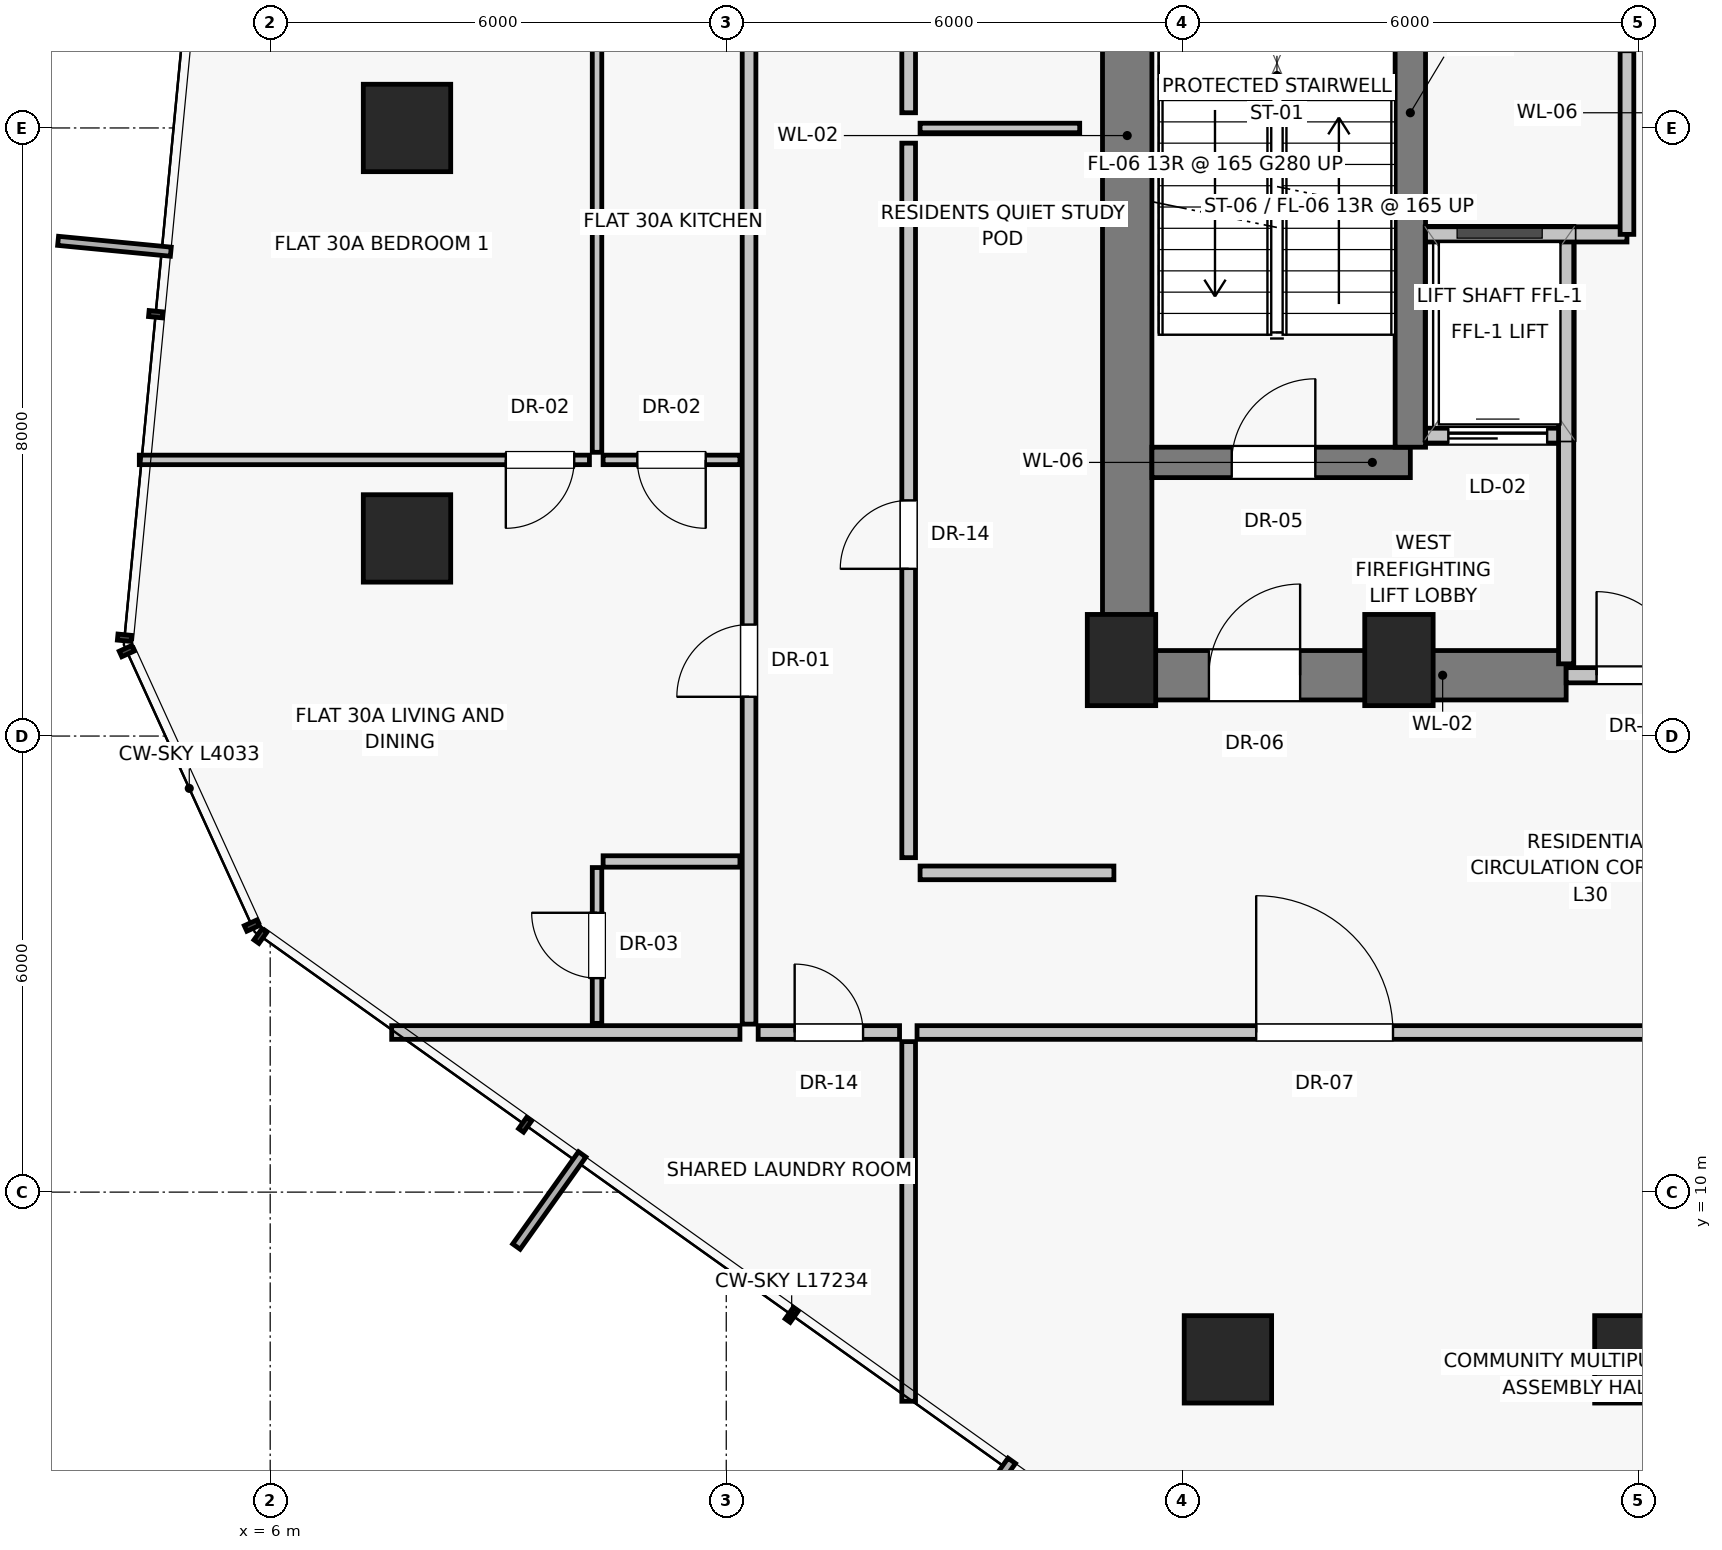
"""IFC4 building model, lengths in metres.
Left out: names, types, materials, properties, quantities, classifications, styles, units other than length and angle.
Written with IfcOpenShell. Run it as: python <this file> out.ifc"""

import sys

from ifc_helpers import new_model, si_unit, direction, frame, frame_2d, origin, origin_2d, place, context, subcontext, project, spatial, rectangle, extrude, source, transform, mapped, element, fill, save


model = new_model("IFC4")
c1 = context("Model", 3, precision=1e-05, world=origin(), true_north=direction((0.0, 1.0)))
c2 = subcontext(c1, "Body", "Model", "MODEL_VIEW")
j1 = project(units=[si_unit("LENGTHUNIT", "METRE"), si_unit("PLANEANGLEUNIT", "RADIAN")], contexts=[c1])
p1 = place(None, origin())
s1 = spatial("IfcSite", under=j1, at=p1, CompositionType="ELEMENT")
p2 = place(p1, origin())
s2 = spatial("IfcBuilding", under=s1, at=p2, CompositionType="ELEMENT")
p3 = place(p2, frame((0.0, 0.0, 108.95)))
s3 = spatial("IfcBuildingStorey", under=s2, at=p3, CompositionType="ELEMENT", Elevation=108.95)
for number, where, z_axis, x_axis in (
    (1, (17.2, 17.0, 0.0), (0.0, 0.0, 1.0), (1.0, 0.0, 0.0)),
    (2, (20.85, 17.0, 0.0), (0.0, 0.0, 1.0), (1.0, 0.0, 0.0)),
):
    element("IfcColumn", number, at=place(p3, frame(where, z_axis=z_axis, x_axis=x_axis)), inside=s3, PredefinedType="PILASTER", context=c2, shape_type="SweptSolid", body=[
        extrude(rectangle(XDim=0.9, YDim=1.2, at=origin_2d()), origin(), (0.0, 0.0, 1.0), 4.3),
    ])
for number, where, z_axis, x_axis in (
    (3, (7.8, 24.0, 0.0), (0.0, 0.0, 1.0), (1.0, 0.0, 0.0)),
    (4, (7.8, 18.6, 0.0), (0.0, 0.0, 1.0), (1.0, 0.0, 0.0)),
    (5, (18.6, 7.8, 0.0), (0.0, 0.0, 1.0), (1.0, 0.0, 0.0)),
    (6, (24.0, 7.8, 0.0), (0.0, 0.0, 1.0), (1.0, 0.0, 0.0)),
):
    element("IfcColumn", number, at=place(p3, frame(where, z_axis=z_axis, x_axis=x_axis)), inside=s3, PredefinedType="COLUMN", context=c2, shape_type="SweptSolid", body=[
        extrude(rectangle(XDim=1.15, YDim=1.15, at=origin_2d()), origin(), (0.0, 0.0, 1.0), 4.3),
    ])
p4 = place(p3, frame((17.275, 16.8, 0.0), z_axis=(0.0, 0.0, 1.0), x_axis=(0.0, 1.0, 0.0)))
e7 = element("IfcWall", 7, at=p4, inside=s3, PredefinedType="SHEAR", context=c2, shape_type="SweptSolid", body=[
    extrude(rectangle(XDim=14.2, YDim=0.65, at=frame_2d((7.1, 0.0))), origin(), (0.0, 0.0, 1.0), 4.05),
])
p5 = place(p3, frame((17.2, 16.8, 0.0), z_axis=(0.0, 0.0, 1.0), x_axis=(1.0, 0.0, 0.0)))
e8 = element("IfcWall", 8, at=p5, inside=s3, PredefinedType="SHEAR", context=c2, shape_type="SweptSolid", body=[
    extrude(rectangle(XDim=5.85, YDim=0.65, at=frame_2d((2.925, 0.0))), origin(), (0.0, 0.0, 1.0), 4.05),
])
p6 = place(p5, frame((1.15, 0.0, 0.0)))
e9 = element("IfcOpeningElement", 9, at=p6, cuts=e8, PredefinedType="OPENING", context=c2, shape_type="SweptSolid", body=[
    extrude(rectangle(XDim=1.2, YDim=2.03, at=frame_2d((0.6, 1.015))), frame((0.0, 0.335, 0.0), z_axis=(0.0, -1.0, 0.0), x_axis=(1.0, 0.0, 0.0)), (0.0, 0.0, 1.0), 0.67),
])
p7 = place(p3, frame((23.05, 16.8, 0.0), z_axis=(0.0, 0.0, 1.0), x_axis=(1.0, 0.0, 0.0)))
e10 = element("IfcWall", 10, at=p7, inside=s3, PredefinedType="SOLIDWALL", context=c2, shape_type="SweptSolid", body=[
    extrude(rectangle(XDim=1.9, YDim=0.2, at=frame_2d((0.95, 0.0))), origin(), (0.0, 0.0, 1.0), 3.2),
])
p8 = place(p7, frame((0.4, 0.0, 0.0)))
e11 = element("IfcOpeningElement", 11, at=p8, cuts=e10, PredefinedType="OPENING", context=c2, shape_type="SweptSolid", body=[
    extrude(rectangle(XDim=1.1, YDim=2.03, at=frame_2d((0.55, 1.015))), frame((0.0, 0.11, 0.0), z_axis=(0.0, -1.0, 0.0), x_axis=(1.0, 0.0, 0.0)), (0.0, 0.0, 1.0), 0.22),
])
p9 = place(p3, frame((17.6, 19.6, 0.0), z_axis=(0.0, 0.0, 1.0), x_axis=(1.0, 0.0, 0.0)))
e12 = element("IfcWall", 12, at=p9, inside=s3, PredefinedType="SHEAR", context=c2, shape_type="SweptSolid", body=[
    extrude(rectangle(XDim=3.4, YDim=0.4, at=frame_2d((1.7, 0.0))), origin(), (0.0, 0.0, 1.0), 4.05),
])
p10 = place(p9, frame((1.05, 0.0, 0.0)))
e13 = element("IfcOpeningElement", 13, at=p10, cuts=e12, PredefinedType="OPENING", context=c2, shape_type="SweptSolid", body=[
    extrude(rectangle(XDim=1.1, YDim=2.03, at=frame_2d((0.55, 1.015))), frame((0.0, 0.21, 0.0), z_axis=(0.0, -1.0, 0.0), x_axis=(1.0, 0.0, 0.0)), (0.0, 0.0, 1.0), 0.42),
])
p11 = place(p3, frame((21.2, 19.95, 0.0), z_axis=(0.0, 0.0, 1.0), x_axis=(1.0, 0.0, 0.0)))
e14 = element("IfcWall", 14, at=p11, inside=s3, PredefinedType="SOLIDWALL", context=c2, shape_type="SweptSolid", body=[
    extrude(rectangle(XDim=1.85, YDim=0.2, at=frame_2d((0.925, 0.0))), origin(), (0.0, 0.0, 1.0), 4.05),
])
p12 = place(p11, frame((0.3, 0.0, 0.0)))
e15 = element("IfcOpeningElement", 15, at=p12, cuts=e14, PredefinedType="OPENING", context=c2, shape_type="SweptSolid", body=[
    extrude(rectangle(XDim=1.3, YDim=2.25, at=frame_2d((0.65, 1.125))), frame((0.0, 0.11, 0.0), z_axis=(0.0, -1.0, 0.0), x_axis=(1.0, 0.0, 0.0)), (0.0, 0.0, 1.0), 0.22),
])
p13 = place(p3, frame((21.0, 19.8, 0.0), z_axis=(0.0, 0.0, 1.0), x_axis=(0.0, 1.0, 0.0)))
e16 = element("IfcWall", 16, at=p13, inside=s3, PredefinedType="SHEAR", context=c2, shape_type="SweptSolid", body=[
    extrude(rectangle(XDim=8.8, YDim=0.4, at=frame_2d((4.4, 0.0))), origin(), (0.0, 0.0, 1.0), 4.05),
])
p14 = place(p3, frame((23.05, 16.95, 0.0), z_axis=(0.0, 0.0, 1.0), x_axis=(0.0, 1.0, 0.0)))
e17 = element("IfcWall", 17, at=p14, inside=s3, PredefinedType="SOLIDWALL", context=c2, shape_type="SweptSolid", body=[
    extrude(rectangle(XDim=5.6, YDim=0.2, at=frame_2d((2.8, 0.0))), origin(), (0.0, 0.0, 1.0), 4.05),
])
p15 = place(p3, frame((21.2, 22.6, 0.0), z_axis=(0.0, 0.0, 1.0), x_axis=(1.0, 0.0, 0.0)))
e18 = element("IfcWall", 18, at=p15, inside=s3, PredefinedType="SOLIDWALL", context=c2, shape_type="SweptSolid", body=[
    extrude(rectangle(XDim=2.65, YDim=0.2, at=frame_2d((1.325, 0.0))), origin(), (0.0, 0.0, 1.0), 4.05),
])
p16 = place(p3, frame((23.85, 22.6, 0.0), z_axis=(0.0, 0.0, 1.0), x_axis=(0.0, 1.0, 0.0)))
e19 = element("IfcWall", 19, at=p16, inside=s3, PredefinedType="PARTITIONING", context=c2, shape_type="SweptSolid", body=[
    extrude(rectangle(XDim=6.1, YDim=0.18, at=frame_2d((3.05, 0.0))), origin(), (0.0, 0.0, 1.0), 4.05),
])
p17 = place(p16, frame((2.4, 0.0, 0.0)))
e20 = element("IfcOpeningElement", 20, at=p17, cuts=e19, PredefinedType="OPENING", context=c2, shape_type="SweptSolid", body=[
    extrude(rectangle(XDim=0.9, YDim=2.01, at=frame_2d((0.45, 1.005))), frame((0.0, 0.1, 0.0), z_axis=(0.0, -1.0, 0.0), x_axis=(1.0, 0.0, 0.0)), (0.0, 0.0, 1.0), 0.2),
])
p18 = place(p3, frame((14.4, 14.4, 0.0), z_axis=(0.0, 0.0, 1.0), x_axis=(0.0, 1.0, 0.0)))
e21 = element("IfcWall", 21, at=p18, inside=s3, PredefinedType="PARTITIONING", context=c2, shape_type="SweptSolid", body=[
    extrude(rectangle(XDim=9.4, YDim=0.18, at=frame_2d((4.7, 0.0))), origin(), (0.0, 0.0, 1.0), 4.05),
])
p19 = place(p18, frame((3.8, 0.0, 0.0)))
e22 = element("IfcOpeningElement", 22, at=p19, cuts=e21, PredefinedType="OPENING", context=c2, shape_type="SweptSolid", body=[
    extrude(rectangle(XDim=0.9, YDim=2.01, at=frame_2d((0.45, 1.005))), frame((0.0, 0.1, 0.0), z_axis=(0.0, -1.0, 0.0), x_axis=(1.0, 0.0, 0.0)), (0.0, 0.0, 1.0), 0.2),
])
p20 = place(p3, frame((14.4, 24.2, 0.0), z_axis=(0.0, 0.0, 1.0), x_axis=(0.0, 1.0, 0.0)))
e23 = element("IfcWall", 23, at=p20, inside=s3, PredefinedType="PARTITIONING", context=c2, shape_type="SweptSolid", body=[
    extrude(rectangle(XDim=9.2, YDim=0.18, at=frame_2d((4.6, 0.0))), origin(), (0.0, 0.0, 1.0), 4.05),
])
p21 = place(p20, frame((3.8, 0.0, 0.0)))
e24 = element("IfcOpeningElement", 24, at=p21, cuts=e23, PredefinedType="OPENING", context=c2, shape_type="SweptSolid", body=[
    extrude(rectangle(XDim=0.9, YDim=2.01, at=frame_2d((0.45, 1.005))), frame((0.0, 0.1, 0.0), z_axis=(0.0, -1.0, 0.0), x_axis=(1.0, 0.0, 0.0)), (0.0, 0.0, 1.0), 0.2),
])
p22 = place(p3, frame((14.55, 24.0, 0.0), z_axis=(0.0, 0.0, 1.0), x_axis=(1.0, 0.0, 0.0)))
e25 = element("IfcWall", 25, at=p22, inside=s3, PredefinedType="PARTITIONING", context=c2, shape_type="SweptSolid", body=[
    extrude(rectangle(XDim=2.1, YDim=0.125, at=frame_2d((1.05, 0.0))), origin(), (0.0, 0.0, 1.0), 4.05),
])
p23 = place(p3, frame((14.55, 14.2, 0.0), z_axis=(0.0, 0.0, 1.0), x_axis=(1.0, 0.0, 0.0)))
e26 = element("IfcWall", 26, at=p23, inside=s3, PredefinedType="PARTITIONING", context=c2, shape_type="SweptSolid", body=[
    extrude(rectangle(XDim=2.55, YDim=0.18, at=frame_2d((1.275, 0.0))), origin(), (0.0, 0.0, 1.0), 4.05),
])
p24 = place(p3, frame((14.4, 11.98, 0.0), z_axis=(0.0, 0.0, 1.0), x_axis=(0.0, -1.0, 0.0)))
e27 = element("IfcWall", 27, at=p24, inside=s3, PredefinedType="PARTITIONING", context=c2, shape_type="SweptSolid", body=[
    extrude(rectangle(XDim=4.732, YDim=0.18, at=frame_2d((2.366, 0.0))), origin(), (0.0, 0.0, 1.0), 4.05),
])
p25 = place(p3, frame((14.51, 12.1, 0.0), z_axis=(0.0, 0.0, 1.0), x_axis=(1.0, 0.0, 0.0)))
e28 = element("IfcWall", 28, at=p25, inside=s3, PredefinedType="PARTITIONING", context=c2, shape_type="SweptSolid", body=[
    extrude(rectangle(XDim=10.724, YDim=0.18, at=frame_2d((5.362, 0.0))), origin(), (0.0, 0.0, 1.0), 3.63),
])
p26 = place(p25, frame((4.462, 0.0, 0.0)))
e29 = element("IfcOpeningElement", 29, at=p26, cuts=e28, PredefinedType="OPENING", context=c2, shape_type="SweptSolid", body=[
    extrude(rectangle(XDim=1.8, YDim=2.25, at=frame_2d((0.9, 1.125))), frame((0.0, 0.1, 0.0), z_axis=(0.0, -1.0, 0.0), x_axis=(1.0, 0.0, 0.0)), (0.0, 0.0, 1.0), 0.2),
])
p27 = place(p3, frame((12.18, 12.1, 0.0), z_axis=(0.0, 0.0, 1.0), x_axis=(-1.0, 0.0, 0.0)))
e30 = element("IfcWall", 30, at=p27, inside=s3, PredefinedType="PARTITIONING", context=c2, shape_type="SweptSolid", body=[
    extrude(rectangle(XDim=4.582, YDim=0.18, at=frame_2d((2.291, 0.0))), origin(), (0.0, 0.0, 1.0), 4.05),
])
p28 = place(p3, frame((12.3, 12.21, 0.0), z_axis=(0.0, 0.0, 1.0), x_axis=(0.0, 1.0, 0.0)))
e31 = element("IfcWall", 31, at=p28, inside=s3, PredefinedType="PARTITIONING", context=c2, shape_type="SweptSolid", body=[
    extrude(rectangle(XDim=13.232, YDim=0.18, at=frame_2d((6.616, 0.0))), origin(), (0.0, 0.0, 1.0), 3.63),
])
p29 = place(p28, frame((4.306, 0.0, 0.0)))
e32 = element("IfcOpeningElement", 32, at=p29, cuts=e31, PredefinedType="OPENING", context=c2, shape_type="SweptSolid", body=[
    extrude(rectangle(XDim=0.95, YDim=2.02, at=frame_2d((0.475, 1.01))), frame((0.0, 0.1, 0.0), z_axis=(0.0, -1.0, 0.0), x_axis=(1.0, 0.0, 0.0)), (0.0, 0.0, 1.0), 0.2),
])
p30 = place(p3, frame((12.18, 14.35, 0.0), z_axis=(0.0, 0.0, 1.0), x_axis=(-1.0, 0.0, 0.0)))
e33 = element("IfcWall", 33, at=p30, inside=s3, PredefinedType="PARTITIONING", context=c2, shape_type="SweptSolid", body=[
    extrude(rectangle(XDim=1.8, YDim=0.15, at=frame_2d((0.9, 0.0))), origin(), (0.0, 0.0, 1.0), 4.05),
])
p31 = place(p3, frame((10.3, 12.22, 0.0), z_axis=(0.0, 0.0, 1.0), x_axis=(0.0, 1.0, 0.0)))
e34 = element("IfcWall", 34, at=p31, inside=s3, PredefinedType="PARTITIONING", context=c2, shape_type="SweptSolid", body=[
    extrude(rectangle(XDim=2.05, YDim=0.125, at=frame_2d((1.025, 0.0))), origin(), (0.0, 0.0, 1.0), 4.05),
])
p32 = place(p31, frame((0.595, 0.0, 0.0)))
e35 = element("IfcOpeningElement", 35, at=p32, cuts=e34, PredefinedType="OPENING", context=c2, shape_type="SweptSolid", body=[
    extrude(rectangle(XDim=0.86, YDim=2.01, at=frame_2d((0.43, 1.005))), frame((0.0, 0.073, 0.0), z_axis=(0.0, -1.0, 0.0), x_axis=(1.0, 0.0, 0.0)), (0.0, 0.0, 1.0), 0.145),
])
p33 = place(p3, frame((12.18, 19.633, 0.0), z_axis=(0.0, 0.0, 1.0), x_axis=(-1.0, 0.0, 0.0)))
e36 = element("IfcWall", 36, at=p33, inside=s3, PredefinedType="PARTITIONING", context=c2, shape_type="SweptSolid", body=[
    extrude(rectangle(XDim=1.8, YDim=0.125, at=frame_2d((0.9, 0.0))), origin(), (0.0, 0.0, 1.0), 4.05),
])
p34 = place(p33, frame((0.45, 0.0, 0.0)))
e37 = element("IfcOpeningElement", 37, at=p34, cuts=e36, PredefinedType="OPENING", context=c2, shape_type="SweptSolid", body=[
    extrude(rectangle(XDim=0.9, YDim=2.01, at=frame_2d((0.45, 1.005))), frame((0.0, 0.073, 0.0), z_axis=(0.0, -1.0, 0.0), x_axis=(1.0, 0.0, 0.0)), (0.0, 0.0, 1.0), 0.145),
])
p35 = place(p3, frame((10.3, 19.733, 0.0), z_axis=(0.0, 0.0, 1.0), x_axis=(0.0, 1.0, 0.0)))
e38 = element("IfcWall", 38, at=p35, inside=s3, PredefinedType="PARTITIONING", context=c2, shape_type="SweptSolid", body=[
    extrude(rectangle(XDim=5.699, YDim=0.125, at=frame_2d((2.85, 0.0))), origin(), (0.0, 0.0, 1.0), 4.05),
])
p36 = place(p3, frame((10.2, 19.633, 0.0), z_axis=(0.0, 0.0, 1.0), x_axis=(-1.0, 0.0, 0.0)))
e39 = element("IfcWall", 39, at=p36, inside=s3, PredefinedType="PARTITIONING", context=c2, shape_type="SweptSolid", body=[
    extrude(rectangle(XDim=5.922, YDim=0.125, at=frame_2d((2.961, 0.0))), origin(), (0.0, 0.0, 1.0), 4.05),
])
p37 = place(p36, frame((0.2, 0.0, 0.0)))
e40 = element("IfcOpeningElement", 40, at=p37, cuts=e39, PredefinedType="OPENING", context=c2, shape_type="SweptSolid", body=[
    extrude(rectangle(XDim=0.9, YDim=2.01, at=frame_2d((0.45, 1.005))), frame((0.0, 0.073, 0.0), z_axis=(0.0, -1.0, 0.0), x_axis=(1.0, 0.0, 0.0)), (0.0, 0.0, 1.0), 0.145),
])
p38 = place(p3, frame((12.42, 12.1, 0.0), z_axis=(0.0, 0.0, 1.0), x_axis=(1.0, 0.0, 0.0)))
e41 = element("IfcWall", 41, at=p38, inside=s3, PredefinedType="PARTITIONING", context=c2, shape_type="SweptSolid", body=[
    extrude(rectangle(XDim=1.86, YDim=0.18, at=frame_2d((0.93, 0.0))), origin(), (0.0, 0.0, 1.0), 4.05),
])
p39 = place(p38, frame((0.48, 0.0, 0.0)))
e42 = element("IfcOpeningElement", 42, at=p39, cuts=e41, PredefinedType="OPENING", context=c2, shape_type="SweptSolid", body=[
    extrude(rectangle(XDim=0.9, YDim=2.01, at=frame_2d((0.45, 1.005))), frame((0.0, 0.1, 0.0), z_axis=(0.0, -1.0, 0.0), x_axis=(1.0, 0.0, 0.0)), (0.0, 0.0, 1.0), 0.2),
])
m1 = source(origin(), c2, "Body", "SweptSolid", [
    extrude(rectangle(XDim=1.2, YDim=2.03, at=frame_2d((0.6, 1.015))), frame((0.0, 0.025, 0.0), z_axis=(0.0, -1.0, 0.0), x_axis=(1.0, 0.0, 0.0)), (0.0, 0.0, 1.0), 0.05),
])
p40 = place(p6, origin())
e43 = element("IfcDoor", 43, at=p40, inside=s3, OperationType="SINGLE_SWING_RIGHT", PredefinedType="DOOR", context=c2, shape_type="MappedRepresentation", body=[
    mapped(m1, transform((0.0, 0.0, 0.0), scale=1.0)),
])
fill(e9, e43)
m2 = source(origin(), c2, "Body", "SweptSolid", [
    extrude(rectangle(XDim=1.1, YDim=2.03, at=frame_2d((0.55, 1.015))), frame((0.0, 0.025, 0.0), z_axis=(0.0, -1.0, 0.0), x_axis=(1.0, 0.0, 0.0)), (0.0, 0.0, 1.0), 0.05),
])
p41 = place(p8, origin())
e44 = element("IfcDoor", 44, at=p41, inside=s3, OperationType="SINGLE_SWING_LEFT", PredefinedType="DOOR", context=c2, shape_type="MappedRepresentation", body=[
    mapped(m2, transform((0.0, 0.0, 0.0), scale=1.0)),
])
fill(e11, e44)
p42 = place(p10, origin())
e45 = element("IfcDoor", 45, at=p42, inside=s3, OperationType="SINGLE_SWING_RIGHT", PredefinedType="DOOR", context=c2, shape_type="MappedRepresentation", body=[
    mapped(m2, transform((0.0, 0.0, 0.0), scale=1.0)),
])
fill(e13, e45)
m3 = source(origin(), c2, "Body", "SweptSolid", [
    extrude(rectangle(XDim=1.3, YDim=2.25, at=frame_2d((0.65, 1.125))), frame((0.0, 0.025, 0.0), z_axis=(0.0, -1.0, 0.0), x_axis=(1.0, 0.0, 0.0)), (0.0, 0.0, 1.0), 0.05),
])
p43 = place(p12, origin())
e46 = element("IfcDoor", 46, at=p43, inside=s3, OperationType="SLIDING_TO_LEFT", PredefinedType="DOOR", context=c2, shape_type="MappedRepresentation", body=[
    mapped(m3, transform((0.0, 0.0, 0.0), scale=1.0)),
])
fill(e15, e46)
m4 = source(origin(), c2, "Body", "SweptSolid", [
    extrude(rectangle(XDim=0.9, YDim=2.01, at=frame_2d((0.45, 1.005))), frame((0.0, 0.025, 0.0), z_axis=(0.0, -1.0, 0.0), x_axis=(1.0, 0.0, 0.0)), (0.0, 0.0, 1.0), 0.05),
])
p44 = place(p19, origin())
e47 = element("IfcDoor", 47, at=p44, inside=s3, OperationType="SINGLE_SWING_LEFT", PredefinedType="DOOR", context=c2, shape_type="MappedRepresentation", body=[
    mapped(m4, transform((0.0, 0.0, 0.0), scale=1.0)),
])
fill(e22, e47)
m5 = source(origin(), c2, "Body", "SweptSolid", [
    extrude(rectangle(XDim=1.8, YDim=2.25, at=frame_2d((0.9, 1.125))), frame((0.0, 0.025, 0.0), z_axis=(0.0, -1.0, 0.0), x_axis=(1.0, 0.0, 0.0)), (0.0, 0.0, 1.0), 0.05),
])
p45 = place(p26, origin())
e48 = element("IfcDoor", 48, at=p45, inside=s3, OperationType="SINGLE_SWING_LEFT", PredefinedType="DOOR", context=c2, shape_type="MappedRepresentation", body=[
    mapped(m5, transform((0.0, 0.0, 0.0), scale=1.0)),
])
fill(e29, e48)
m6 = source(origin(), c2, "Body", "SweptSolid", [
    extrude(rectangle(XDim=0.95, YDim=2.02, at=frame_2d((0.475, 1.01))), frame((0.0, 0.025, 0.0), z_axis=(0.0, -1.0, 0.0), x_axis=(1.0, 0.0, 0.0)), (0.0, 0.0, 1.0), 0.05),
])
p46 = place(p29, origin())
e49 = element("IfcDoor", 49, at=p46, inside=s3, OperationType="SINGLE_SWING_LEFT", PredefinedType="DOOR", context=c2, shape_type="MappedRepresentation", body=[
    mapped(m6, transform((0.0, 0.0, 0.0), scale=1.0)),
])
fill(e32, e49)
m7 = source(origin(), c2, "Body", "SweptSolid", [
    extrude(rectangle(XDim=0.86, YDim=2.01, at=frame_2d((0.43, 1.005))), frame((0.0, 0.025, 0.0), z_axis=(0.0, -1.0, 0.0), x_axis=(1.0, 0.0, 0.0)), (0.0, 0.0, 1.0), 0.05),
])
p47 = place(p32, origin())
e50 = element("IfcDoor", 50, at=p47, inside=s3, OperationType="SINGLE_SWING_RIGHT", PredefinedType="DOOR", context=c2, shape_type="MappedRepresentation", body=[
    mapped(m7, transform((0.0, 0.0, 0.0), scale=1.0)),
])
fill(e35, e50)
p48 = place(p34, origin())
e51 = element("IfcDoor", 51, at=p48, inside=s3, OperationType="SINGLE_SWING_LEFT", PredefinedType="DOOR", context=c2, shape_type="MappedRepresentation", body=[
    mapped(m4, transform((0.0, 0.0, 0.0), scale=1.0)),
])
fill(e37, e51)
p49 = place(p37, origin())
e52 = element("IfcDoor", 52, at=p49, inside=s3, OperationType="SINGLE_SWING_RIGHT", PredefinedType="DOOR", context=c2, shape_type="MappedRepresentation", body=[
    mapped(m4, transform((0.0, 0.0, 0.0), scale=1.0)),
])
fill(e40, e52)
p50 = place(p39, origin())
e53 = element("IfcDoor", 53, at=p50, inside=s3, OperationType="SINGLE_SWING_LEFT", PredefinedType="DOOR", context=c2, shape_type="MappedRepresentation", body=[
    mapped(m4, transform((0.0, 0.0, 0.0), scale=1.0)),
])
fill(e42, e53)
save(model, sys.argv[1])
